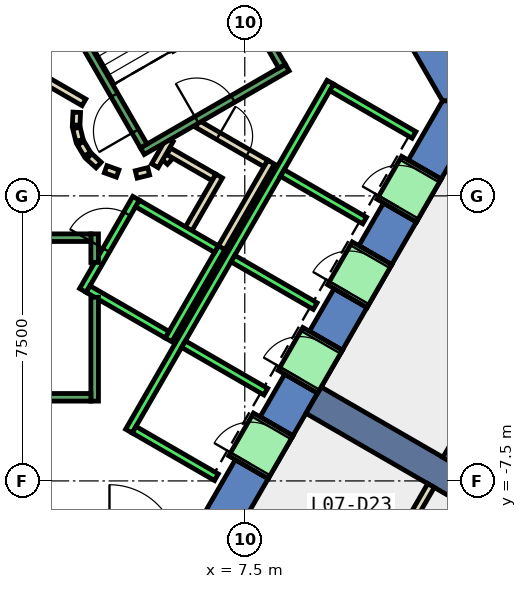
"""IFC4 building model, lengths in metres.
Left out: names, types, materials, properties, quantities, classifications, styles, units other than length and angle.
Written with IfcOpenShell. Run it as: python <this file> out.ifc"""

import sys

from ifc_helpers import new_model, si_unit, direction, frame, frame_2d, origin, place, context, subcontext, project, spatial, polyline, rectangle, outline, extrude, element, fill, save


model = new_model("IFC4")
c1 = context("Model", 3, precision=1e-05, world=origin(), true_north=direction((0.0, 1.0)))
c2 = subcontext(c1, "Body", "Model", "MODEL_VIEW")
j1 = project(units=[si_unit("LENGTHUNIT", "METRE"), si_unit("PLANEANGLEUNIT", "RADIAN")], contexts=[c1])
p1 = place(None, origin())
s1 = spatial("IfcSite", under=j1, at=p1, CompositionType="ELEMENT")
p2 = place(p1, origin())
s2 = spatial("IfcBuilding", under=s1, at=p2, CompositionType="ELEMENT")
p3 = place(p2, frame((0.0, 0.0, 39.2)))
s3 = spatial("IfcBuildingStorey", under=s2, at=p3, CompositionType="ELEMENT", Elevation=39.2)
p4 = place(p3, frame((0.0, 0.0, -0.4)))
e1 = element("IfcWall", 1, at=p4, inside=s3, PredefinedType="SHEAR", context=c2, shape_type="SweptSolid", body=[
    extrude(outline(polyline([(8.517, 11.748), (7.651, 11.248), (12.702, 2.5), (13.856, 2.5), (8.517, 11.748)])), origin(), (0.0, 0.0, 1.0), 4.2),
])
p5 = place(p3, frame((0.0, 0.0, -0.4)))
e2 = element("IfcWall", 2, at=p5, inside=s3, PredefinedType="SHEAR", context=c2, shape_type="SweptSolid", body=[
    extrude(outline(polyline([(8.117, -7.44), (7.252, -6.94), (6.351, -8.5), (6.928, -9.5), (8.117, -7.44)])), origin(), (0.0, 0.0, 1.0), 4.2),
])
p6 = place(p3, frame((0.0, 0.0, -0.4)))
e3 = element("IfcWall", 3, at=p6, inside=s3, PredefinedType="SHEAR", context=c2, shape_type="SweptSolid", body=[
    extrude(outline(polyline([(9.417, -5.189), (8.551, -4.689), (7.902, -5.814), (8.767, -6.314), (9.417, -5.189)])), origin(), (0.0, 0.0, 1.0), 4.2),
])
p7 = place(p3, frame((0.0, 0.0, -0.4)))
e4 = element("IfcWall", 4, at=p7, inside=s3, PredefinedType="SHEAR", context=c2, shape_type="SweptSolid", body=[
    extrude(outline(polyline([(10.717, -2.937), (9.851, -2.437), (9.201, -3.563), (10.067, -4.063), (10.717, -2.937)])), origin(), (0.0, 0.0, 1.0), 4.2),
])
p8 = place(p3, frame((0.0, 0.0, -0.4)))
e5 = element("IfcWall", 5, at=p8, inside=s3, PredefinedType="SHEAR", context=c2, shape_type="SweptSolid", body=[
    extrude(outline(polyline([(12.017, -0.686), (11.151, -0.186), (10.501, -1.311), (11.367, -1.811), (12.017, -0.686)])), origin(), (0.0, 0.0, 1.0), 4.2),
])
p9 = place(p3, frame((0.0, 0.0, -0.4)))
e6 = element("IfcWall", 6, at=p9, inside=s3, PredefinedType="SHEAR", context=c2, shape_type="SweptSolid", body=[
    extrude(outline(polyline([(11.801, 0.94), (12.667, 0.44), (13.856, 2.5), (12.702, 2.5), (11.801, 0.94)])), origin(), (0.0, 0.0, 1.0), 4.2),
])
p10 = place(p3, frame((0.0, 0.0, 3.6)))
e7 = element("IfcWall", 7, at=p10, inside=s3, PredefinedType="SHEAR", context=c2, shape_type="SweptSolid", body=[
    extrude(outline(polyline([(8.767, -6.314), (7.902, -5.814), (7.252, -6.94), (8.117, -7.44), (8.767, -6.314)])), origin(), (0.0, 0.0, 1.0), 0.2),
])
p11 = place(p3, frame((0.0, 0.0, 3.6)))
e8 = element("IfcWall", 8, at=p11, inside=s3, PredefinedType="SHEAR", context=c2, shape_type="SweptSolid", body=[
    extrude(outline(polyline([(10.067, -4.063), (9.201, -3.563), (8.551, -4.689), (9.417, -5.189), (10.067, -4.063)])), origin(), (0.0, 0.0, 1.0), 0.2),
])
p12 = place(p3, frame((0.0, 0.0, 3.6)))
e9 = element("IfcWall", 9, at=p12, inside=s3, PredefinedType="SHEAR", context=c2, shape_type="SweptSolid", body=[
    extrude(outline(polyline([(11.367, -1.811), (10.501, -1.311), (9.851, -2.437), (10.717, -2.937), (11.367, -1.811)])), origin(), (0.0, 0.0, 1.0), 0.2),
])
p13 = place(p3, frame((0.0, 0.0, 3.6)))
e10 = element("IfcWall", 10, at=p13, inside=s3, PredefinedType="SHEAR", context=c2, shape_type="SweptSolid", body=[
    extrude(outline(polyline([(12.667, 0.44), (11.801, 0.94), (11.151, -0.186), (12.017, -0.686), (12.667, 0.44)])), origin(), (0.0, 0.0, 1.0), 0.2),
])
p14 = place(p3, frame((9.31, -5.375, -0.4), z_axis=(0.0, 0.0, 1.0), x_axis=(0.866017533419, -0.500013631625, 0.0)))
e11 = element("IfcWall", 11, at=p14, inside=s3, PredefinedType="SHEAR", context=c2, shape_type="SweptSolid", body=[
    extrude(rectangle(XDim=9.0, YDim=0.8, at=frame_2d((4.5, 0.0))), origin(), (0.0, 0.0, 1.0), 4.2),
])
p15 = place(p3, frame((5.39, 0.898, 0.0), z_axis=(0.0, 0.0, 1.0), x_axis=(0.673828488714, 0.738887791073, 0.0)))
e12 = element("IfcWall", 12, at=p15, inside=s3, PredefinedType="PARTITIONING", context=c2, shape_type="SweptSolid", body=[
    extrude(rectangle(XDim=0.263, YDim=0.2, at=frame_2d((0.131, 0.0))), origin(), (0.0, 0.0, 1.0), 3.8),
])
p16 = place(p3, frame((5.499, 1.172, 0.0), z_axis=(0.0, 0.0, 1.0), x_axis=(0.866333505267, -0.499465972466, 0.0)))
e13 = element("IfcWall", 13, at=p16, inside=s3, PredefinedType="PARTITIONING", context=c2, shape_type="SweptSolid", body=[
    extrude(rectangle(XDim=1.374, YDim=0.2, at=frame_2d((0.687, 0.0))), origin(), (0.0, 0.0, 1.0), 3.8),
])
p17 = place(p3, frame((6.826, 0.522, 0.0), z_axis=(0.0, 0.0, 1.0), x_axis=(-0.500016722714, -0.866015748706, 0.0)))
e14 = element("IfcWall", 14, at=p17, inside=s3, PredefinedType="PARTITIONING", context=c2, shape_type="SweptSolid", body=[
    extrude(rectangle(XDim=1.7, YDim=0.2, at=frame_2d((0.85, 0.0))), origin(), (0.0, 0.0, 1.0), 3.8),
])
p18 = place(p3, frame((6.25, 1.894, 0.0), z_axis=(0.0, 0.0, 1.0), x_axis=(0.866043184279, -0.499969202016, 0.0)))
e15 = element("IfcWall", 15, at=p18, inside=s3, PredefinedType="PARTITIONING", context=c2, shape_type="SweptSolid", body=[
    extrude(rectangle(XDim=2.084, YDim=0.2, at=frame_2d((1.042, 0.0))), origin(), (0.0, 0.0, 1.0), 3.8),
])
p19 = place(p18, frame((0.642, 0.0, 0.0)))
e16 = element("IfcOpeningElement", 16, at=p19, cuts=e15, PredefinedType="OPENING", context=c2, shape_type="SweptSolid", body=[
    extrude(rectangle(XDim=0.9, YDim=2.1, at=frame_2d((0.45, 1.05))), frame((0.0, 0.11, 0.0), z_axis=(0.0, -1.0, 0.0), x_axis=(1.0, 0.0, 0.0)), (0.0, 0.0, 1.0), 0.22),
])
p20 = place(p3, frame((8.192, 0.888, 0.0), z_axis=(0.0, 0.0, 1.0), x_axis=(-0.499940625693, -0.866059680843, 0.0)))
e17 = element("IfcWall", 17, at=p20, inside=s3, PredefinedType="PARTITIONING", context=c2, shape_type="SweptSolid", body=[
    extrude(rectangle(XDim=2.68, YDim=0.2, at=frame_2d((1.34, 0.0))), origin(), (0.0, 0.0, 1.0), 3.8),
])
p21 = place(p3, frame((5.135, 0.793, 0.0), z_axis=(0.0, 0.0, 1.0), x_axis=(0.499526442893, 0.866298639529, 0.0)))
e18 = element("IfcWall", 18, at=p21, inside=s3, PredefinedType="PARTITIONING", context=c2, shape_type="SweptSolid", body=[
    extrude(rectangle(XDim=0.791, YDim=0.2, at=frame_2d((0.396, 0.0))), origin(), (0.0, 0.0, 1.0), 3.8),
])
p22 = place(p3, frame((2.012, 3.186, 0.0), z_axis=(0.0, 0.0, 1.0), x_axis=(0.865891012941, -0.500232699559, 0.0)))
e19 = element("IfcWall", 19, at=p22, inside=s3, PredefinedType="PARTITIONING", context=c2, shape_type="SweptSolid", body=[
    extrude(rectangle(XDim=1.449, YDim=0.2, at=frame_2d((0.725, 0.0))), origin(), (0.0, 0.0, 1.0), 3.8),
])
p23 = place(p3, frame((3.079, 2.199, 0.0), z_axis=(0.0, 0.0, 1.0), x_axis=(-0.047771483479, -0.998858290933, 0.0)))
e20 = element("IfcWall", 20, at=p23, inside=s3, PredefinedType="PARTITIONING", context=c2, shape_type="SweptSolid", body=[
    extrude(rectangle(XDim=0.337, YDim=0.2, at=frame_2d((0.169, 0.0))), origin(), (0.0, 0.0, 1.0), 3.8),
])
p24 = place(p3, frame((3.07, 1.786, 0.0), z_axis=(0.0, 0.0, 1.0), x_axis=(0.242705583207, -0.970099994784, 0.0)))
e21 = element("IfcWall", 21, at=p24, inside=s3, PredefinedType="PARTITIONING", context=c2, shape_type="SweptSolid", body=[
    extrude(rectangle(XDim=0.338, YDim=0.2, at=frame_2d((0.169, 0.0))), origin(), (0.0, 0.0, 1.0), 3.8),
])
for number, where, z_axis, x_axis in (
    (22, (3.182, 1.388, 0.0), (0.0, 0.0, 1.0), (0.512, -0.859, 0.0)),
    (23, (3.404, 1.039, 0.0), (0.0, 0.0, 1.0), (0.74, -0.672, 0.0)),
):
    element("IfcWall", number, at=place(p3, frame(where, z_axis=z_axis, x_axis=x_axis)), inside=s3, PredefinedType="PARTITIONING", context=c2, shape_type="SweptSolid", body=[
        extrude(rectangle(XDim=0.338, YDim=0.2, at=frame_2d((0.169, 0.0))), origin(), (0.0, 0.0, 1.0), 3.8),
    ])
p25 = place(p3, frame((3.838, 0.702, 0.0), z_axis=(0.0, 0.0, 1.0), x_axis=(0.941035081519, -0.338308993895, 0.0)))
e24 = element("IfcWall", 24, at=p25, inside=s3, PredefinedType="PARTITIONING", context=c2, shape_type="SweptSolid", body=[
    extrude(rectangle(XDim=0.337, YDim=0.2, at=frame_2d((0.168, 0.0))), origin(), (0.0, 0.0, 1.0), 3.8),
])
p26 = place(p3, frame((4.644, 0.564, 0.0), z_axis=(0.0, 0.0, 1.0), x_axis=(0.969929076366, 0.243387729394, 0.0)))
e25 = element("IfcWall", 25, at=p26, inside=s3, PredefinedType="PARTITIONING", context=c2, shape_type="SweptSolid", body=[
    extrude(rectangle(XDim=0.337, YDim=0.2, at=frame_2d((0.168, 0.0))), origin(), (0.0, 0.0, 1.0), 3.8),
])
p27 = place(p3, frame((15.122, -2.908, 0.0), z_axis=(0.0, 0.0, 1.0), x_axis=(-0.499922740561, -0.866070004948, 0.0)))
e26 = element("IfcWall", 26, at=p27, inside=s3, PredefinedType="PARTITIONING", context=c2, shape_type="SweptSolid", body=[
    extrude(rectangle(XDim=4.643, YDim=0.2, at=frame_2d((2.321, 0.0))), origin(), (0.0, 0.0, 1.0), 3.8),
])
p28 = place(p3, frame((12.401, -7.621, 0.0), z_axis=(0.0, 0.0, 1.0), x_axis=(-0.499983724212, -0.866034800411, 0.0)))
e27 = element("IfcWall", 27, at=p28, inside=s3, PredefinedType="PARTITIONING", context=c2, shape_type="SweptSolid", body=[
    extrude(rectangle(XDim=9.302, YDim=0.2, at=frame_2d((4.651, 0.0))), origin(), (0.0, 0.0, 1.0), 3.8),
])
p29 = place(p28, frame((1.429, 0.0, 0.0)))
e28 = element("IfcOpeningElement", 28, at=p29, cuts=e27, PredefinedType="OPENING", context=c2, shape_type="SweptSolid", body=[
    extrude(rectangle(XDim=1.0, YDim=2.1, at=frame_2d((0.5, 1.05))), frame((0.0, 0.11, 0.0), z_axis=(0.0, -1.0, 0.0), x_axis=(1.0, 0.0, 0.0)), (0.0, 0.0, 1.0), 0.22),
])
p30 = place(p28, frame((2.529, 0.0, 0.0)))
e29 = element("IfcOpeningElement", 29, at=p30, cuts=e27, PredefinedType="OPENING", context=c2, shape_type="SweptSolid", body=[
    extrude(rectangle(XDim=1.0, YDim=2.1, at=frame_2d((0.5, 1.05))), frame((0.0, 0.11, 0.0), z_axis=(0.0, -1.0, 0.0), x_axis=(1.0, 0.0, 0.0)), (0.0, 0.0, 1.0), 0.22),
])
p31 = place(p3, frame((3.24, -2.488, 0.0), z_axis=(0.0, 0.0, 1.0), x_axis=(0.49994636267, 0.866056369097, 0.0)))
e30 = element("IfcWall", 30, at=p31, inside=s3, PredefinedType="STANDARD", context=c2, shape_type="SweptSolid", body=[
    extrude(rectangle(XDim=2.8, YDim=0.2, at=frame_2d((1.4, 0.0))), origin(), (0.0, 0.0, 1.0), 3.8),
])
p32 = place(p31, frame((1.225, 0.0, 0.0)))
e31 = element("IfcOpeningElement", 31, at=p32, cuts=e30, PredefinedType="OPENING", context=c2, shape_type="SweptSolid", body=[
    extrude(rectangle(XDim=1.1, YDim=2.1, at=frame_2d((0.55, 1.05))), frame((0.0, 0.11, 0.0), z_axis=(0.0, -1.0, 0.0), x_axis=(1.0, 0.0, 0.0)), (0.0, 0.0, 1.0), 0.22),
])
p33 = place(p3, frame((5.492, -3.788, 0.0), z_axis=(0.0, 0.0, 1.0), x_axis=(0.500011755427, 0.866018616679, 0.0)))
e32 = element("IfcWall", 32, at=p33, inside=s3, PredefinedType="STANDARD", context=c2, shape_type="SweptSolid", body=[
    extrude(rectangle(XDim=2.8, YDim=0.2, at=frame_2d((1.4, 0.0))), origin(), (0.0, 0.0, 1.0), 3.8),
])
p34 = place(p3, frame((3.377, -2.452, 0.0), z_axis=(0.0, 0.0, 1.0), x_axis=(0.865955154139, -0.50012165622, 0.0)))
e33 = element("IfcWall", 33, at=p34, inside=s3, PredefinedType="STANDARD", context=c2, shape_type="SweptSolid", body=[
    extrude(rectangle(XDim=2.4, YDim=0.2, at=frame_2d((1.2, 0.0))), origin(), (0.0, 0.0, 1.0), 3.8),
])
p35 = place(p3, frame((4.677, -0.2, 0.0), z_axis=(0.0, 0.0, 1.0), x_axis=(0.865973769406, -0.500089422704, 0.0)))
e34 = element("IfcWall", 34, at=p35, inside=s3, PredefinedType="STANDARD", context=c2, shape_type="SweptSolid", body=[
    extrude(rectangle(XDim=2.399, YDim=0.2, at=frame_2d((1.2, 0.0))), origin(), (0.0, 0.0, 1.0), 3.8),
])
p36 = place(p3, frame((4.451, -6.19, 0.0), z_axis=(0.0, 0.0, 1.0), x_axis=(0.50000090737, 0.866024879913, 0.0)))
e35 = element("IfcWall", 35, at=p36, inside=s3, PredefinedType="STANDARD", context=c2, shape_type="SweptSolid", body=[
    extrude(rectangle(XDim=10.6, YDim=0.2, at=frame_2d((5.3, 0.0))), origin(), (0.0, 0.0, 1.0), 3.8),
])
for number, where, z_axis, x_axis in (
    (36, (4.588, -6.153, 0.0), (0.0, 0.0, 1.0), (0.866, -0.5, 0.0)),
    (37, (5.888, -3.902, 0.0), (0.0, 0.0, 1.0), (0.866, -0.5, 0.0)),
    (38, (7.188, -1.65, 0.0), (0.0, 0.0, 1.0), (0.866, -0.5, 0.0)),
    (39, (8.488, 0.602, 0.0), (0.0, 0.0, 1.0), (0.866, -0.5, 0.0)),
):
    element("IfcWall", number, at=place(p3, frame(where, z_axis=z_axis, x_axis=x_axis)), inside=s3, PredefinedType="STANDARD", context=c2, shape_type="SweptSolid", body=[
        extrude(rectangle(XDim=2.5, YDim=0.2, at=frame_2d((1.25, 0.0))), origin(), (0.0, 0.0, 1.0), 3.8),
    ])
p37 = place(p3, frame((9.788, 2.853, 0.0), z_axis=(0.0, 0.0, 1.0), x_axis=(0.865998541277, -0.500046524342, 0.0)))
e40 = element("IfcWall", 40, at=p37, inside=s3, PredefinedType="STANDARD", context=c2, shape_type="SweptSolid", body=[
    extrude(rectangle(XDim=2.5, YDim=0.2, at=frame_2d((1.25, 0.0))), origin(), (0.0, 0.0, 1.0), 3.8),
])
p38 = place(p3, frame((7.598, -7.14, 0.0), z_axis=(0.0, 0.0, 1.0), x_axis=(0.500362116554, 0.865816234728, 0.0)))
e41 = element("IfcWall", 41, at=p38, inside=s3, PredefinedType="STANDARD", context=c2, shape_type="SweptSolid", body=[
    extrude(rectangle(XDim=1.299, YDim=1.2, at=frame_2d((0.65, 0.0))), origin(), (0.0, 0.0, 1.0), 2.4),
])
p39 = place(p38, frame((0.1, 0.0, 0.0)))
e42 = element("IfcOpeningElement", 42, at=p39, cuts=e41, PredefinedType="OPENING", context=c2, shape_type="SweptSolid", body=[
    extrude(rectangle(XDim=1.1, YDim=2.3, at=frame_2d((0.55, 1.15))), frame((0.0, 0.61, 0.0), z_axis=(0.0, -1.0, 0.0), x_axis=(1.0, 0.0, 0.0)), (0.0, 0.0, 1.0), 1.22),
])
p40 = place(p3, frame((8.898, -4.889, 0.0), z_axis=(0.0, 0.0, 1.0), x_axis=(0.500036693733, 0.866004217611, 0.0)))
e43 = element("IfcWall", 43, at=p40, inside=s3, PredefinedType="STANDARD", context=c2, shape_type="SweptSolid", body=[
    extrude(rectangle(XDim=1.3, YDim=1.2, at=frame_2d((0.65, 0.0))), origin(), (0.0, 0.0, 1.0), 2.4),
])
p41 = place(p40, frame((0.1, 0.0, 0.0)))
e44 = element("IfcOpeningElement", 44, at=p41, cuts=e43, PredefinedType="OPENING", context=c2, shape_type="SweptSolid", body=[
    extrude(rectangle(XDim=1.1, YDim=2.3, at=frame_2d((0.55, 1.15))), frame((0.0, 0.61, 0.0), z_axis=(0.0, -1.0, 0.0), x_axis=(1.0, 0.0, 0.0)), (0.0, 0.0, 1.0), 1.22),
])
p42 = place(p3, frame((10.198, -2.637, 0.0), z_axis=(0.0, 0.0, 1.0), x_axis=(0.49989585183, 0.866085525409, 0.0)))
e45 = element("IfcWall", 45, at=p42, inside=s3, PredefinedType="STANDARD", context=c2, shape_type="SweptSolid", body=[
    extrude(rectangle(XDim=1.3, YDim=1.2, at=frame_2d((0.65, 0.0))), origin(), (0.0, 0.0, 1.0), 2.4),
])
p43 = place(p42, frame((0.1, 0.0, 0.0)))
e46 = element("IfcOpeningElement", 46, at=p43, cuts=e45, PredefinedType="OPENING", context=c2, shape_type="SweptSolid", body=[
    extrude(rectangle(XDim=1.1, YDim=2.3, at=frame_2d((0.55, 1.15))), frame((0.0, 0.61, 0.0), z_axis=(0.0, -1.0, 0.0), x_axis=(1.0, 0.0, 0.0)), (0.0, 0.0, 1.0), 1.22),
])
p44 = place(p3, frame((11.498, -0.385, 0.0), z_axis=(0.0, 0.0, 1.0), x_axis=(0.500221244143, 0.865897630733, 0.0)))
e47 = element("IfcWall", 47, at=p44, inside=s3, PredefinedType="STANDARD", context=c2, shape_type="SweptSolid", body=[
    extrude(rectangle(XDim=1.299, YDim=1.2, at=frame_2d((0.65, 0.0))), origin(), (0.0, 0.0, 1.0), 2.4),
])
p45 = place(p44, frame((0.1, 0.0, 0.0)))
e48 = element("IfcOpeningElement", 48, at=p45, cuts=e47, PredefinedType="OPENING", context=c2, shape_type="SweptSolid", body=[
    extrude(rectangle(XDim=1.1, YDim=2.3, at=frame_2d((0.55, 1.15))), frame((0.0, 0.61, 0.0), z_axis=(0.0, -1.0, 0.0), x_axis=(1.0, 0.0, 0.0)), (0.0, 0.0, 1.0), 1.22),
])
p46 = place(p3, frame((3.55, -2.667, 0.0), z_axis=(0.0, 0.0, 1.0), x_axis=(0.0, -1.0, 0.0)))
e49 = element("IfcWall", 49, at=p46, inside=s3, PredefinedType="STANDARD", context=c2, shape_type="SweptSolid", body=[
    extrude(rectangle(XDim=2.733, YDim=0.2, at=frame_2d((1.366, 0.0))), origin(), (0.0, 0.0, 1.0), 3.8),
])
p47 = place(p3, frame((3.55, -1.0, 0.0), z_axis=(0.0, 0.0, 1.0), x_axis=(0.0, -1.0, 0.0)))
e50 = element("IfcWall", 50, at=p47, inside=s3, PredefinedType="STANDARD", context=c2, shape_type="SweptSolid", body=[
    extrude(rectangle(XDim=0.751, YDim=0.2, at=frame_2d((0.375, 0.0))), origin(), (0.0, 0.0, 1.0), 3.8),
])
p48 = place(p3, frame((-3.45, -1.1, 0.0), z_axis=(0.0, 0.0, 1.0), x_axis=(1.0, 0.0, 0.0)))
e51 = element("IfcWall", 51, at=p48, inside=s3, PredefinedType="STANDARD", context=c2, shape_type="SweptSolid", body=[
    extrude(rectangle(XDim=6.9, YDim=0.2, at=frame_2d((3.45, 0.0))), origin(), (0.0, 0.0, 1.0), 3.8),
])
p49 = place(p48, frame((0.45, 0.0, 0.0)))
e52 = element("IfcOpeningElement", 52, at=p49, cuts=e51, PredefinedType="OPENING", context=c2, shape_type="SweptSolid", body=[
    extrude(rectangle(XDim=1.1, YDim=2.2, at=frame_2d((0.55, 1.1))), frame((0.0, 0.11, 0.0), z_axis=(0.0, -1.0, 0.0), x_axis=(1.0, 0.0, 0.0)), (0.0, 0.0, 1.0), 0.22),
])
p50 = place(p3, frame((-3.45, -5.3, 0.0), z_axis=(0.0, 0.0, 1.0), x_axis=(1.0, 0.0, 0.0)))
e53 = element("IfcWall", 53, at=p50, inside=s3, PredefinedType="STANDARD", context=c2, shape_type="SweptSolid", body=[
    extrude(rectangle(XDim=6.9, YDim=0.2, at=frame_2d((3.45, 0.0))), origin(), (0.0, 0.0, 1.0), 3.8),
])
p51 = place(p3, frame((4.806, 1.176, 0.0), z_axis=(0.0, 0.0, 1.0), x_axis=(0.866059941101, 0.499940174841, 0.0)))
e54 = element("IfcWall", 54, at=p51, inside=s3, PredefinedType="STANDARD", context=c2, shape_type="SweptSolid", body=[
    extrude(rectangle(XDim=4.4, YDim=0.2, at=frame_2d((2.2, 0.0))), origin(), (0.0, 0.0, 1.0), 3.8),
])
p52 = place(p51, frame((1.65, 0.0, 0.0)))
e55 = element("IfcOpeningElement", 55, at=p52, cuts=e54, PredefinedType="OPENING", context=c2, shape_type="SweptSolid", body=[
    extrude(rectangle(XDim=1.1, YDim=2.2, at=frame_2d((0.55, 1.1))), frame((0.0, 0.11, 0.0), z_axis=(0.0, -1.0, 0.0), x_axis=(1.0, 0.0, 0.0)), (0.0, 0.0, 1.0), 0.22),
])
p53 = place(p3, frame((4.843, 1.312, 0.0), z_axis=(0.0, 0.0, 1.0), x_axis=(-0.499963383562, 0.866046543262, 0.0)))
e56 = element("IfcWall", 56, at=p53, inside=s3, PredefinedType="STANDARD", context=c2, shape_type="SweptSolid", body=[
    extrude(rectangle(XDim=6.9, YDim=0.2, at=frame_2d((3.45, 0.0))), origin(), (0.0, 0.0, 1.0), 3.8),
])
p54 = place(p53, frame((0.45, 0.0, 0.0)))
e57 = element("IfcOpeningElement", 57, at=p54, cuts=e56, PredefinedType="OPENING", context=c2, shape_type="SweptSolid", body=[
    extrude(rectangle(XDim=1.1, YDim=2.2, at=frame_2d((0.55, 1.1))), frame((0.0, 0.11, 0.0), z_axis=(0.0, -1.0, 0.0), x_axis=(1.0, 0.0, 0.0)), (0.0, 0.0, 1.0), 0.22),
])
p55 = place(p3, frame((8.48, 3.412, 0.0), z_axis=(0.0, 0.0, 1.0), x_axis=(-0.499978703459, 0.866037698999, 0.0)))
e58 = element("IfcWall", 58, at=p55, inside=s3, PredefinedType="STANDARD", context=c2, shape_type="SweptSolid", body=[
    extrude(rectangle(XDim=6.9, YDim=0.2, at=frame_2d((3.45, 0.0))), origin(), (0.0, 0.0, 1.0), 3.8),
])
p56 = place(p19, origin())
e59 = element("IfcDoor", 59, at=p56, inside=s3, OperationType="SINGLE_SWING_LEFT", PredefinedType="DOOR", context=c2, shape_type="SweptSolid", body=[
    extrude(rectangle(XDim=0.9, YDim=2.1, at=frame_2d((0.45, 1.05))), frame((0.0, 0.025, 0.0), z_axis=(0.0, -1.0, 0.0), x_axis=(1.0, 0.0, 0.0)), (0.0, 0.0, 1.0), 0.05),
])
fill(e16, e59)
p57 = place(p39, origin())
e60 = element("IfcDoor", 60, at=p57, inside=s3, OperationType="SLIDING_TO_LEFT", PredefinedType="DOOR", context=c2, shape_type="SweptSolid", body=[
    extrude(rectangle(XDim=1.1, YDim=2.3, at=frame_2d((0.55, 1.15))), frame((0.0, 0.025, 0.0), z_axis=(0.0, -1.0, 0.0), x_axis=(1.0, 0.0, 0.0)), (0.0, 0.0, 1.0), 0.05),
])
fill(e42, e60)
p58 = place(p41, origin())
e61 = element("IfcDoor", 61, at=p58, inside=s3, OperationType="SLIDING_TO_LEFT", PredefinedType="DOOR", context=c2, shape_type="SweptSolid", body=[
    extrude(rectangle(XDim=1.1, YDim=2.3, at=frame_2d((0.55, 1.15))), frame((0.0, 0.025, 0.0), z_axis=(0.0, -1.0, 0.0), x_axis=(1.0, 0.0, 0.0)), (0.0, 0.0, 1.0), 0.05),
])
fill(e44, e61)
p59 = place(p43, origin())
e62 = element("IfcDoor", 62, at=p59, inside=s3, OperationType="SLIDING_TO_LEFT", PredefinedType="DOOR", context=c2, shape_type="SweptSolid", body=[
    extrude(rectangle(XDim=1.1, YDim=2.3, at=frame_2d((0.55, 1.15))), frame((0.0, 0.025, 0.0), z_axis=(0.0, -1.0, 0.0), x_axis=(1.0, 0.0, 0.0)), (0.0, 0.0, 1.0), 0.05),
])
fill(e46, e62)
p60 = place(p45, origin())
e63 = element("IfcDoor", 63, at=p60, inside=s3, OperationType="SLIDING_TO_LEFT", PredefinedType="DOOR", context=c2, shape_type="SweptSolid", body=[
    extrude(rectangle(XDim=1.1, YDim=2.3, at=frame_2d((0.55, 1.15))), frame((0.0, 0.025, 0.0), z_axis=(0.0, -1.0, 0.0), x_axis=(1.0, 0.0, 0.0)), (0.0, 0.0, 1.0), 0.05),
])
fill(e48, e63)
p61 = place(p32, origin())
e64 = element("IfcDoor", 64, at=p61, inside=s3, OperationType="SLIDING_TO_LEFT", PredefinedType="DOOR", context=c2, shape_type="SweptSolid", body=[
    extrude(rectangle(XDim=1.1, YDim=2.1, at=frame_2d((0.55, 1.05))), frame((0.0, 0.025, 0.0), z_axis=(0.0, -1.0, 0.0), x_axis=(1.0, 0.0, 0.0)), (0.0, 0.0, 1.0), 0.05),
])
fill(e31, e64)
p62 = place(p54, origin())
e65 = element("IfcDoor", 65, at=p62, inside=s3, OperationType="SINGLE_SWING_LEFT", PredefinedType="DOOR", context=c2, shape_type="SweptSolid", body=[
    extrude(rectangle(XDim=1.1, YDim=2.2, at=frame_2d((0.55, 1.1))), frame((0.0, 0.025, 0.0), z_axis=(0.0, -1.0, 0.0), x_axis=(1.0, 0.0, 0.0)), (0.0, 0.0, 1.0), 0.05),
])
fill(e57, e65)
p63 = place(p52, origin())
e66 = element("IfcDoor", 66, at=p63, inside=s3, OperationType="SINGLE_SWING_LEFT", PredefinedType="DOOR", context=c2, shape_type="SweptSolid", body=[
    extrude(rectangle(XDim=1.1, YDim=2.2, at=frame_2d((0.55, 1.1))), frame((0.0, 0.025, 0.0), z_axis=(0.0, -1.0, 0.0), x_axis=(1.0, 0.0, 0.0)), (0.0, 0.0, 1.0), 0.05),
])
fill(e55, e66)
save(model, sys.argv[1])
